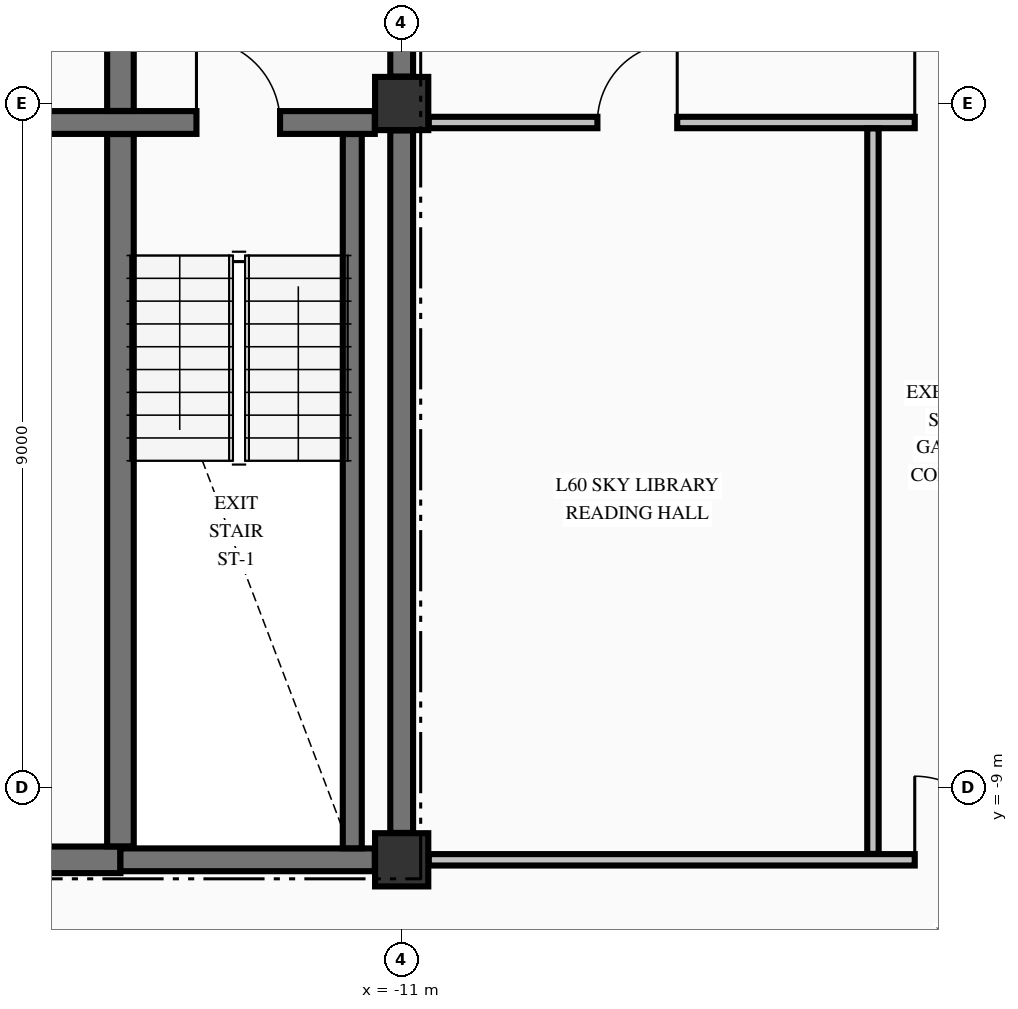
"""IFC4 building model, lengths in metres.
Left out: names, types, materials, properties, quantities, classifications, styles, units other than length and angle.
Written with IfcOpenShell. Run it as: python <this file> out.ifc"""

import sys

from ifc_helpers import new_model, si_unit, direction, frame, frame_2d, origin, origin_2d, place, context, subcontext, project, spatial, rectangle, extrude, element, fill, save


model = new_model("IFC4")
c1 = context("Model", 3, precision=1e-05, world=origin(), true_north=direction((0.0, 1.0)))
c2 = subcontext(c1, "Body", "Model", "MODEL_VIEW")
j1 = project(units=[si_unit("LENGTHUNIT", "METRE"), si_unit("PLANEANGLEUNIT", "RADIAN")], contexts=[c1])
p1 = place(None, origin())
s1 = spatial("IfcSite", under=j1, at=p1, CompositionType="ELEMENT")
p2 = place(p1, origin())
s2 = spatial("IfcBuilding", under=s1, at=p2, CompositionType="ELEMENT")
p3 = place(p2, frame((0.0, 0.0, 230.05)))
s3 = spatial("IfcBuildingStorey", under=s2, at=p3, CompositionType="ELEMENT", Elevation=230.05)
for number, where, z_axis, x_axis in (
    (1, (-11.0, -9.95, -0.25), (0.0, 0.0, 1.0), (1.0, 0.0, 0.0)),
    (2, (-11.0, 0.0, -0.25), (0.0, 0.0, 1.0), (1.0, 0.0, 0.0)),
):
    element("IfcColumn", number, at=place(p3, frame(where, z_axis=z_axis, x_axis=x_axis)), inside=s3, PredefinedType="COLUMN", context=c2, shape_type="SweptSolid", body=[
        extrude(rectangle(XDim=0.7, YDim=0.7, at=origin_2d()), origin(), (0.0, 0.0, 1.0), 3.23),
    ])
p4 = place(p3, frame((-19.646, -9.95, 0.0), z_axis=(0.0, 0.0, 1.0), x_axis=(1.0, 0.0, 0.0)))
e3 = element("IfcWall", 3, at=p4, inside=s3, PredefinedType="SHEAR", context=c2, shape_type="SweptSolid", body=[
    extrude(rectangle(XDim=4.946, YDim=0.35, at=frame_2d((2.473, 0.0))), origin(), (0.0, 0.0, 1.0), 2.98),
])
p5 = place(p4, frame((0.821, 0.0, 0.0)))
e4 = element("IfcOpeningElement", 4, at=p5, cuts=e3, PredefinedType="OPENING", context=c2, shape_type="SweptSolid", body=[
    extrude(rectangle(XDim=1.05, YDim=2.15, at=frame_2d((0.525, 1.075))), frame((0.0, 0.185, 0.0), z_axis=(0.0, -1.0, 0.0), x_axis=(1.0, 0.0, 0.0)), (0.0, 0.0, 1.0), 0.37),
])
p6 = place(p3, frame((-14.7, -9.95, 0.0), z_axis=(0.0, 0.0, 1.0), x_axis=(1.0, 0.0, 0.0)))
e5 = element("IfcWall", 5, at=p6, inside=s3, PredefinedType="SHEAR", context=c2, shape_type="SweptSolid", body=[
    extrude(rectangle(XDim=3.346, YDim=0.3, at=frame_2d((1.673, 0.0))), origin(), (0.0, 0.0, 1.0), 2.98),
])
p7 = place(p3, frame((-20.571, -0.25, 0.0), z_axis=(0.0, 0.0, 1.0), x_axis=(1.0, 0.0, 0.0)))
e6 = element("IfcWall", 6, at=p7, inside=s3, PredefinedType="SHEAR", context=c2, shape_type="SweptSolid", body=[
    extrude(rectangle(XDim=9.217, YDim=0.3, at=frame_2d((4.608, 0.0))), origin(), (0.0, 0.0, 1.0), 2.98),
])
p8 = place(p7, frame((6.871, 0.0, 0.0)))
e7 = element("IfcOpeningElement", 7, at=p8, cuts=e6, PredefinedType="OPENING", context=c2, shape_type="SweptSolid", body=[
    extrude(rectangle(XDim=1.1, YDim=2.15, at=frame_2d((0.55, 1.075))), frame((0.0, 0.16, 0.0), z_axis=(0.0, -1.0, 0.0), x_axis=(1.0, 0.0, 0.0)), (0.0, 0.0, 1.0), 0.32),
])
p9 = place(p3, frame((-10.644, -9.95, 0.0), z_axis=(0.0, 0.0, 1.0), x_axis=(1.0, 0.0, 0.0)))
e8 = element("IfcWall", 8, at=p9, inside=s3, PredefinedType="PARTITIONING", context=c2, shape_type="SweptSolid", body=[
    extrude(rectangle(XDim=21.288, YDim=0.15, at=frame_2d((10.644, 0.0))), origin(), (0.0, 0.0, 1.0), 2.98),
])
p10 = place(p9, frame((6.394, 0.0, 0.0)))
e9 = element("IfcOpeningElement", 9, at=p10, cuts=e8, PredefinedType="OPENING", context=c2, shape_type="SweptSolid", body=[
    extrude(rectangle(XDim=1.1, YDim=2.15, at=frame_2d((0.55, 1.075))), frame((0.0, 0.085, 0.0), z_axis=(0.0, -1.0, 0.0), x_axis=(1.0, 0.0, 0.0)), (0.0, 0.0, 1.0), 0.17),
])
p11 = place(p9, frame((13.769, 0.0, 0.0)))
e10 = element("IfcOpeningElement", 10, at=p11, cuts=e8, PredefinedType="OPENING", context=c2, shape_type="SweptSolid", body=[
    extrude(rectangle(XDim=0.95, YDim=2.15, at=frame_2d((0.475, 1.075))), frame((0.0, 0.085, 0.0), z_axis=(0.0, -1.0, 0.0), x_axis=(1.0, 0.0, 0.0)), (0.0, 0.0, 1.0), 0.17),
])
p12 = place(p9, frame((17.994, 0.0, 0.0)))
e11 = element("IfcOpeningElement", 11, at=p12, cuts=e8, PredefinedType="OPENING", context=c2, shape_type="SweptSolid", body=[
    extrude(rectangle(XDim=0.9, YDim=2.15, at=frame_2d((0.45, 1.075))), frame((0.0, 0.085, 0.0), z_axis=(0.0, -1.0, 0.0), x_axis=(1.0, 0.0, 0.0)), (0.0, 0.0, 1.0), 0.17),
])
p13 = place(p3, frame((-10.644, -0.25, 0.0), z_axis=(0.0, 0.0, 1.0), x_axis=(1.0, 0.0, 0.0)))
e12 = element("IfcWall", 12, at=p13, inside=s3, PredefinedType="PARTITIONING", context=c2, shape_type="SweptSolid", body=[
    extrude(rectangle(XDim=21.288, YDim=0.15, at=frame_2d((10.644, 0.0))), origin(), (0.0, 0.0, 1.0), 2.98),
])
p14 = place(p13, frame((6.394, 0.0, 0.0)))
e13 = element("IfcOpeningElement", 13, at=p14, cuts=e12, PredefinedType="OPENING", context=c2, shape_type="SweptSolid", body=[
    extrude(rectangle(XDim=1.1, YDim=2.15, at=frame_2d((0.55, 1.075))), frame((0.0, 0.085, 0.0), z_axis=(0.0, -1.0, 0.0), x_axis=(1.0, 0.0, 0.0)), (0.0, 0.0, 1.0), 0.17),
])
p15 = place(p13, frame((2.219, 0.0, 0.0)))
e14 = element("IfcOpeningElement", 14, at=p15, cuts=e12, PredefinedType="OPENING", context=c2, shape_type="SweptSolid", body=[
    extrude(rectangle(XDim=1.05, YDim=2.15, at=frame_2d((0.525, 1.075))), frame((0.0, 0.085, 0.0), z_axis=(0.0, -1.0, 0.0), x_axis=(1.0, 0.0, 0.0)), (0.0, 0.0, 1.0), 0.17),
])
p16 = place(p13, frame((14.369, 0.0, 0.0)))
e15 = element("IfcOpeningElement", 15, at=p16, cuts=e12, PredefinedType="OPENING", context=c2, shape_type="SweptSolid", body=[
    extrude(rectangle(XDim=0.95, YDim=2.15, at=frame_2d((0.475, 1.075))), frame((0.0, 0.085, 0.0), z_axis=(0.0, -1.0, 0.0), x_axis=(1.0, 0.0, 0.0)), (0.0, 0.0, 1.0), 0.17),
])
p17 = place(p3, frame((-14.7, -9.773, 0.0), z_axis=(0.0, 0.0, 1.0), x_axis=(0.0, 1.0, 0.0)))
e16 = element("IfcWall", 16, at=p17, inside=s3, PredefinedType="SHEAR", context=c2, shape_type="SweptSolid", body=[
    extrude(rectangle(XDim=9.371, YDim=0.35, at=frame_2d((4.686, 0.0))), origin(), (0.0, 0.0, 1.0), 2.98),
])
p18 = place(p3, frame((-14.7, -0.098, 0.0), z_axis=(0.0, 0.0, 1.0), x_axis=(0.0, 1.0, 0.0)))
e17 = element("IfcWall", 17, at=p18, inside=s3, PredefinedType="SHEAR", context=c2, shape_type="SweptSolid", body=[
    extrude(rectangle(XDim=2.846, YDim=0.35, at=frame_2d((1.423, 0.0))), origin(), (0.0, 0.0, 1.0), 2.98),
])
p19 = place(p3, frame((-11.65, -9.798, 0.0), z_axis=(0.0, 0.0, 1.0), x_axis=(0.0, 1.0, 0.0)))
e18 = element("IfcWall", 18, at=p19, inside=s3, PredefinedType="SOLIDWALL", context=c2, shape_type="SweptSolid", body=[
    extrude(rectangle(XDim=9.396, YDim=0.25, at=frame_2d((4.698, 0.0))), origin(), (0.0, 0.0, 1.0), 2.98),
])
p20 = place(p3, frame((-11.0, -9.596, 0.0), z_axis=(0.0, 0.0, 1.0), x_axis=(0.0, 1.0, 0.0)))
e19 = element("IfcWall", 19, at=p20, inside=s3, PredefinedType="SHEAR", context=c2, shape_type="SweptSolid", body=[
    extrude(rectangle(XDim=9.242, YDim=0.3, at=frame_2d((4.621, 0.0))), origin(), (0.0, 0.0, 1.0), 2.98),
])
p21 = place(p3, frame((-11.0, 0.354, 0.0), z_axis=(0.0, 0.0, 1.0), x_axis=(0.0, 1.0, 0.0)))
e20 = element("IfcWall", 20, at=p21, inside=s3, PredefinedType="SHEAR", context=c2, shape_type="SweptSolid", body=[
    extrude(rectangle(XDim=2.394, YDim=0.3, at=frame_2d((1.197, 0.0))), origin(), (0.0, 0.0, 1.0), 2.98),
])
p22 = place(p21, frame((0.746, 0.0, 0.0)))
e21 = element("IfcOpeningElement", 21, at=p22, cuts=e20, PredefinedType="OPENING", context=c2, shape_type="SweptSolid", body=[
    extrude(rectangle(XDim=1.1, YDim=2.15, at=frame_2d((0.55, 1.075))), frame((0.0, 0.16, 0.0), z_axis=(0.0, -1.0, 0.0), x_axis=(1.0, 0.0, 0.0)), (0.0, 0.0, 1.0), 0.32),
])
p23 = place(p3, frame((-4.8, -9.872, 0.0), z_axis=(0.0, 0.0, 1.0), x_axis=(0.0, 1.0, 0.0)))
e22 = element("IfcWall", 22, at=p23, inside=s3, PredefinedType="PARTITIONING", context=c2, shape_type="SweptSolid", body=[
    extrude(rectangle(XDim=9.544, YDim=0.15, at=frame_2d((4.772, 0.0))), origin(), (0.0, 0.0, 1.0), 2.98),
])
p24 = place(p8, origin())
e23 = element("IfcDoor", 23, at=p24, inside=s3, OperationType="SINGLE_SWING_LEFT", PredefinedType="DOOR", context=c2, shape_type="SweptSolid", body=[
    extrude(rectangle(XDim=1.1, YDim=2.15, at=frame_2d((0.55, 1.075))), frame((0.0, 0.025, 0.0), z_axis=(0.0, -1.0, 0.0), x_axis=(1.0, 0.0, 0.0)), (0.0, 0.0, 1.0), 0.05),
])
fill(e7, e23)
p25 = place(p10, origin())
e24 = element("IfcDoor", 24, at=p25, inside=s3, OperationType="SINGLE_SWING_LEFT", PredefinedType="DOOR", context=c2, shape_type="SweptSolid", body=[
    extrude(rectangle(XDim=1.1, YDim=2.15, at=frame_2d((0.55, 1.075))), frame((0.0, 0.025, 0.0), z_axis=(0.0, -1.0, 0.0), x_axis=(1.0, 0.0, 0.0)), (0.0, 0.0, 1.0), 0.05),
])
fill(e9, e24)
p26 = place(p14, origin())
e25 = element("IfcDoor", 25, at=p26, inside=s3, OperationType="SINGLE_SWING_LEFT", PredefinedType="DOOR", context=c2, shape_type="SweptSolid", body=[
    extrude(rectangle(XDim=1.1, YDim=2.15, at=frame_2d((0.55, 1.075))), frame((0.0, 0.025, 0.0), z_axis=(0.0, -1.0, 0.0), x_axis=(1.0, 0.0, 0.0)), (0.0, 0.0, 1.0), 0.05),
])
fill(e13, e25)
p27 = place(p15, origin())
e26 = element("IfcDoor", 26, at=p27, inside=s3, OperationType="SINGLE_SWING_RIGHT", PredefinedType="DOOR", context=c2, shape_type="SweptSolid", body=[
    extrude(rectangle(XDim=1.05, YDim=2.15, at=frame_2d((0.525, 1.075))), frame((0.0, 0.025, 0.0), z_axis=(0.0, -1.0, 0.0), x_axis=(1.0, 0.0, 0.0)), (0.0, 0.0, 1.0), 0.05),
])
fill(e14, e26)
save(model, sys.argv[1])
